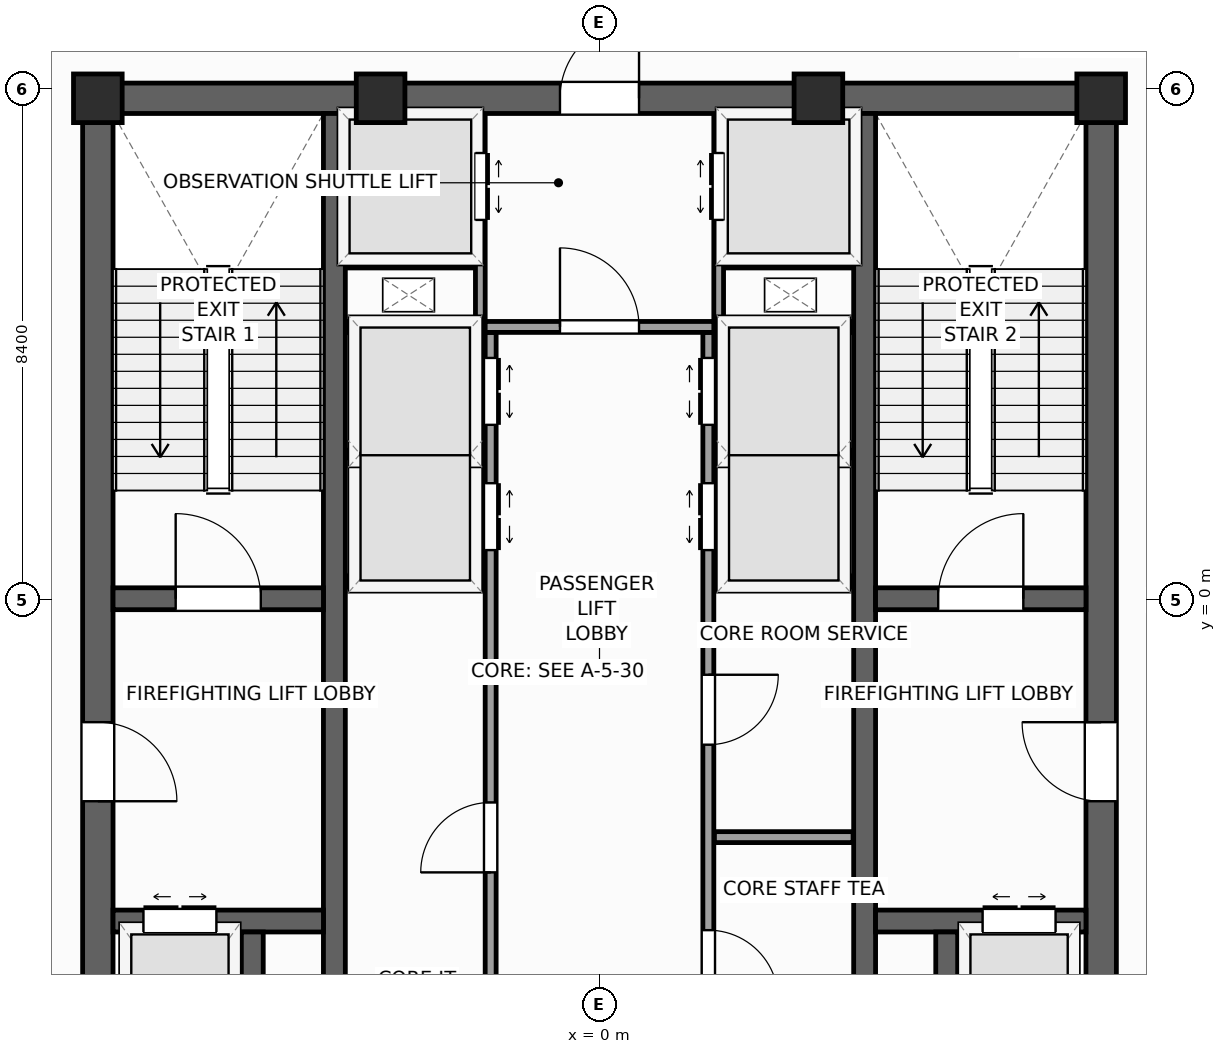
"""IFC4 building model, lengths in metres.
Left out: names, types, materials, properties, quantities, classifications, styles, units other than length and angle.
Written with IfcOpenShell. Run it as: python <this file> out.ifc"""

import sys

from ifc_helpers import new_model, si_unit, direction, frame, frame_2d, origin, origin_2d, place, context, subcontext, project, spatial, rectangle, extrude, source, transform, mapped, element, fill, save


model = new_model("IFC4")
c1 = context("Model", 3, precision=1e-05, world=origin(), true_north=direction((0.0, 1.0)))
c2 = subcontext(c1, "Body", "Model", "MODEL_VIEW")
j1 = project(units=[si_unit("LENGTHUNIT", "METRE"), si_unit("PLANEANGLEUNIT", "RADIAN")], contexts=[c1])
p1 = place(None, origin())
s1 = spatial("IfcSite", under=j1, at=p1, CompositionType="ELEMENT")
p2 = place(p1, origin())
s2 = spatial("IfcBuilding", under=s1, at=p2, CompositionType="ELEMENT")
p3 = place(p2, frame((0.0, 0.0, 312.0)))
s3 = spatial("IfcBuildingStorey", under=s2, at=p3, CompositionType="ELEMENT", Elevation=312.0)
p4 = place(p3, frame((-8.5, 8.25, 0.0), z_axis=(0.0, 0.0, 1.0), x_axis=(1.0, 0.0, 0.0)))
e1 = element("IfcWall", 1, at=p4, inside=s3, PredefinedType="SHEAR", context=c2, shape_type="SweptSolid", body=[
    extrude(rectangle(XDim=17.0, YDim=0.5, at=frame_2d((8.5, 0.0))), origin(), (0.0, 0.0, 1.0), 4.8),
])
p5 = place(p4, frame((7.85, 0.0, 0.0)))
e2 = element("IfcOpeningElement", 2, at=p5, cuts=e1, PredefinedType="OPENING", context=c2, shape_type="SweptSolid", body=[
    extrude(rectangle(XDim=1.3, YDim=2.2, at=frame_2d((0.65, 1.1))), frame((0.0, 0.26, 0.0), z_axis=(0.0, -1.0, 0.0), x_axis=(1.0, 0.0, 0.0)), (0.0, 0.0, 1.0), 0.52),
])
p6 = place(p3, frame((-8.25, -8.0, 0.0), z_axis=(0.0, 0.0, 1.0), x_axis=(0.0, 1.0, 0.0)))
e3 = element("IfcWall", 3, at=p6, inside=s3, PredefinedType="SHEAR", context=c2, shape_type="SweptSolid", body=[
    extrude(rectangle(XDim=16.0, YDim=0.5, at=frame_2d((8.0, 0.0))), origin(), (0.0, 0.0, 1.0), 4.8),
])
p7 = place(p6, frame((4.69, 0.0, 0.0)))
e4 = element("IfcOpeningElement", 4, at=p7, cuts=e3, PredefinedType="OPENING", context=c2, shape_type="SweptSolid", body=[
    extrude(rectangle(XDim=1.3, YDim=2.2, at=frame_2d((0.65, 1.1))), frame((0.0, 0.26, 0.0), z_axis=(0.0, -1.0, 0.0), x_axis=(1.0, 0.0, 0.0)), (0.0, 0.0, 1.0), 0.52),
])
p8 = place(p3, frame((8.25, -8.0, 0.0), z_axis=(0.0, 0.0, 1.0), x_axis=(0.0, 1.0, 0.0)))
e5 = element("IfcWall", 5, at=p8, inside=s3, PredefinedType="SHEAR", context=c2, shape_type="SweptSolid", body=[
    extrude(rectangle(XDim=16.0, YDim=0.5, at=frame_2d((8.0, 0.0))), origin(), (0.0, 0.0, 1.0), 4.8),
])
p9 = place(p8, frame((4.69, 0.0, 0.0)))
e6 = element("IfcOpeningElement", 6, at=p9, cuts=e5, PredefinedType="OPENING", context=c2, shape_type="SweptSolid", body=[
    extrude(rectangle(XDim=1.3, YDim=2.2, at=frame_2d((0.65, 1.1))), frame((0.0, 0.26, 0.0), z_axis=(0.0, -1.0, 0.0), x_axis=(1.0, 0.0, 0.0)), (0.0, 0.0, 1.0), 0.52),
])
for number, where, z_axis, x_axis in (
    (7, (-4.36, -8.0, 0.0), (0.0, 0.0, 1.0), (0.0, 1.0, 0.0)),
    (8, (4.36, -8.0, 0.0), (0.0, 0.0, 1.0), (0.0, 1.0, 0.0)),
):
    element("IfcWall", number, at=place(p3, frame(where, z_axis=z_axis, x_axis=x_axis)), inside=s3, PredefinedType="SHEAR", context=c2, shape_type="SweptSolid", body=[
        extrude(rectangle(XDim=16.0, YDim=0.36, at=frame_2d((8.0, 0.0))), origin(), (0.0, 0.0, 1.0), 4.8),
    ])
p10 = place(p3, frame((-8.0, 0.02, 0.0), z_axis=(0.0, 0.0, 1.0), x_axis=(1.0, 0.0, 0.0)))
e9 = element("IfcWall", 9, at=p10, inside=s3, PredefinedType="SHEAR", context=c2, shape_type="SweptSolid", body=[
    extrude(rectangle(XDim=3.46, YDim=0.36, at=frame_2d((1.73, 0.0))), origin(), (0.0, 0.0, 1.0), 4.8),
])
p11 = place(p10, frame((1.03, 0.0, 0.0)))
e10 = element("IfcOpeningElement", 10, at=p11, cuts=e9, PredefinedType="OPENING", context=c2, shape_type="SweptSolid", body=[
    extrude(rectangle(XDim=1.4, YDim=2.2, at=frame_2d((0.7, 1.1))), frame((0.0, 0.19, 0.0), z_axis=(0.0, -1.0, 0.0), x_axis=(1.0, 0.0, 0.0)), (0.0, 0.0, 1.0), 0.38),
])
p12 = place(p3, frame((4.54, 0.02, 0.0), z_axis=(0.0, 0.0, 1.0), x_axis=(1.0, 0.0, 0.0)))
e11 = element("IfcWall", 11, at=p12, inside=s3, PredefinedType="SHEAR", context=c2, shape_type="SweptSolid", body=[
    extrude(rectangle(XDim=3.46, YDim=0.36, at=frame_2d((1.73, 0.0))), origin(), (0.0, 0.0, 1.0), 4.8),
])
p13 = place(p12, frame((1.03, 0.0, 0.0)))
e12 = element("IfcOpeningElement", 12, at=p13, cuts=e11, PredefinedType="OPENING", context=c2, shape_type="SweptSolid", body=[
    extrude(rectangle(XDim=1.4, YDim=2.2, at=frame_2d((0.7, 1.1))), frame((0.0, 0.19, 0.0), z_axis=(0.0, -1.0, 0.0), x_axis=(1.0, 0.0, 0.0)), (0.0, 0.0, 1.0), 0.38),
])
p14 = place(p3, frame((-8.0, -5.28, 0.0), z_axis=(0.0, 0.0, 1.0), x_axis=(1.0, 0.0, 0.0)))
e13 = element("IfcWall", 13, at=p14, inside=s3, PredefinedType="SHEAR", context=c2, shape_type="SweptSolid", body=[
    extrude(rectangle(XDim=3.46, YDim=0.36, at=frame_2d((1.73, 0.0))), origin(), (0.0, 0.0, 1.0), 4.8),
])
p15 = place(p14, frame((0.5, 0.0, 0.0)))
e14 = element("IfcOpeningElement", 14, at=p15, cuts=e13, PredefinedType="OPENING", context=c2, shape_type="SweptSolid", body=[
    extrude(rectangle(XDim=1.2, YDim=2.25, at=frame_2d((0.6, 1.125))), frame((0.0, 0.19, 0.0), z_axis=(0.0, -1.0, 0.0), x_axis=(1.0, 0.0, 0.0)), (0.0, 0.0, 1.0), 0.38),
])
p16 = place(p3, frame((4.54, -5.28, 0.0), z_axis=(0.0, 0.0, 1.0), x_axis=(1.0, 0.0, 0.0)))
e15 = element("IfcWall", 15, at=p16, inside=s3, PredefinedType="SHEAR", context=c2, shape_type="SweptSolid", body=[
    extrude(rectangle(XDim=3.46, YDim=0.36, at=frame_2d((1.73, 0.0))), origin(), (0.0, 0.0, 1.0), 4.8),
])
p17 = place(p16, frame((1.76, 0.0, 0.0)))
e16 = element("IfcOpeningElement", 16, at=p17, cuts=e15, PredefinedType="OPENING", context=c2, shape_type="SweptSolid", body=[
    extrude(rectangle(XDim=1.2, YDim=2.25, at=frame_2d((0.6, 1.125))), frame((0.0, 0.19, 0.0), z_axis=(0.0, -1.0, 0.0), x_axis=(1.0, 0.0, 0.0)), (0.0, 0.0, 1.0), 0.38),
])
for number, where, z_axis, x_axis in (
    (17, (-5.71, -8.0, 0.0), (0.0, 0.0, 1.0), (0.0, 1.0, 0.0)),
    (18, (5.71, -8.0, 0.0), (0.0, 0.0, 1.0), (0.0, 1.0, 0.0)),
):
    element("IfcWall", number, at=place(p3, frame(where, z_axis=z_axis, x_axis=x_axis)), inside=s3, PredefinedType="SHEAR", context=c2, shape_type="SweptSolid", body=[
        extrude(rectangle(XDim=2.54, YDim=0.36, at=frame_2d((1.27, 0.0))), origin(), (0.0, 0.0, 1.0), 4.8),
    ])
m1 = source(origin(), c2, "Body", "SweptSolid", [
    extrude(rectangle(XDim=0.8, YDim=0.8, at=origin_2d()), origin(), (0.0, 0.0, 1.0), 4.8),
])
for number, where, z_axis, x_axis in (
    (19, (8.25, 8.25, 0.0), (0.0, 0.0, 1.0), (1.0, 0.0, 0.0)),
    (20, (-8.25, 8.25, 0.0), (0.0, 0.0, 1.0), (1.0, 0.0, 0.0)),
    (21, (-3.6, 8.25, 0.0), (0.0, 0.0, 1.0), (1.0, 0.0, 0.0)),
    (22, (3.6, 8.25, 0.0), (0.0, 0.0, 1.0), (1.0, 0.0, 0.0)),
):
    element("IfcColumn", number, at=place(p3, frame(where, z_axis=z_axis, x_axis=x_axis)), inside=s3, PredefinedType="PILASTER", context=c2, shape_type="MappedRepresentation", body=[
        mapped(m1, transform((0.0, 0.0, 0.0), scale=1.0)),
    ])
p18 = place(p3, frame((-1.79, -7.98, 0.0), z_axis=(0.0, 0.0, 1.0), x_axis=(0.0, 1.0, 0.0)))
e23 = element("IfcWall", 23, at=p18, inside=s3, PredefinedType="PARTITIONING", context=c2, shape_type="SweptSolid", body=[
    extrude(rectangle(XDim=12.38, YDim=0.18, at=frame_2d((6.19, 0.0))), origin(), (0.0, 0.0, 1.0), 4.55),
])
p19 = place(p18, frame((8.8, 0.0, 0.0)))
e24 = element("IfcOpeningElement", 24, at=p19, cuts=e23, PredefinedType="OPENING", context=c2, shape_type="SweptSolid", body=[
    extrude(rectangle(XDim=1.1, YDim=2.2, at=frame_2d((0.55, 1.1))), frame((0.0, 0.1, 0.0), z_axis=(0.0, -1.0, 0.0), x_axis=(1.0, 0.0, 0.0)), (0.0, 0.0, 1.0), 0.2),
])
p20 = place(p18, frame((10.86, 0.0, 0.0)))
e25 = element("IfcOpeningElement", 25, at=p20, cuts=e23, PredefinedType="OPENING", context=c2, shape_type="SweptSolid", body=[
    extrude(rectangle(XDim=1.1, YDim=2.2, at=frame_2d((0.55, 1.1))), frame((0.0, 0.1, 0.0), z_axis=(0.0, -1.0, 0.0), x_axis=(1.0, 0.0, 0.0)), (0.0, 0.0, 1.0), 0.2),
])
p21 = place(p18, frame((3.5, 0.0, 0.0)))
e26 = element("IfcOpeningElement", 26, at=p21, cuts=e23, PredefinedType="OPENING", context=c2, shape_type="SweptSolid", body=[
    extrude(rectangle(XDim=1.15, YDim=2.25, at=frame_2d((0.575, 1.125))), frame((0.0, 0.1, 0.0), z_axis=(0.0, -1.0, 0.0), x_axis=(1.0, 0.0, 0.0)), (0.0, 0.0, 1.0), 0.2),
])
p22 = place(p3, frame((1.79, -7.98, 0.0), z_axis=(0.0, 0.0, 1.0), x_axis=(0.0, 1.0, 0.0)))
e27 = element("IfcWall", 27, at=p22, inside=s3, PredefinedType="PARTITIONING", context=c2, shape_type="SweptSolid", body=[
    extrude(rectangle(XDim=12.38, YDim=0.18, at=frame_2d((6.19, 0.0))), origin(), (0.0, 0.0, 1.0), 4.55),
])
p23 = place(p22, frame((8.8, 0.0, 0.0)))
e28 = element("IfcOpeningElement", 28, at=p23, cuts=e27, PredefinedType="OPENING", context=c2, shape_type="SweptSolid", body=[
    extrude(rectangle(XDim=1.1, YDim=2.2, at=frame_2d((0.55, 1.1))), frame((0.0, 0.1, 0.0), z_axis=(0.0, -1.0, 0.0), x_axis=(1.0, 0.0, 0.0)), (0.0, 0.0, 1.0), 0.2),
])
p24 = place(p22, frame((10.86, 0.0, 0.0)))
e29 = element("IfcOpeningElement", 29, at=p24, cuts=e27, PredefinedType="OPENING", context=c2, shape_type="SweptSolid", body=[
    extrude(rectangle(XDim=1.1, YDim=2.2, at=frame_2d((0.55, 1.1))), frame((0.0, 0.1, 0.0), z_axis=(0.0, -1.0, 0.0), x_axis=(1.0, 0.0, 0.0)), (0.0, 0.0, 1.0), 0.2),
])
p25 = place(p22, frame((1.4, 0.0, 0.0)))
e30 = element("IfcOpeningElement", 30, at=p25, cuts=e27, PredefinedType="OPENING", context=c2, shape_type="SweptSolid", body=[
    extrude(rectangle(XDim=1.15, YDim=2.25, at=frame_2d((0.575, 1.125))), frame((0.0, 0.1, 0.0), z_axis=(0.0, -1.0, 0.0), x_axis=(1.0, 0.0, 0.0)), (0.0, 0.0, 1.0), 0.2),
])
p26 = place(p22, frame((5.6, 0.0, 0.0)))
e31 = element("IfcOpeningElement", 31, at=p26, cuts=e27, PredefinedType="OPENING", context=c2, shape_type="SweptSolid", body=[
    extrude(rectangle(XDim=1.15, YDim=2.25, at=frame_2d((0.575, 1.125))), frame((0.0, 0.1, 0.0), z_axis=(0.0, -1.0, 0.0), x_axis=(1.0, 0.0, 0.0)), (0.0, 0.0, 1.0), 0.2),
])
p27 = place(p3, frame((-1.88, 4.49, 0.0), z_axis=(0.0, 0.0, 1.0), x_axis=(1.0, 0.0, 0.0)))
e32 = element("IfcWall", 32, at=p27, inside=s3, PredefinedType="PARTITIONING", context=c2, shape_type="SweptSolid", body=[
    extrude(rectangle(XDim=3.76, YDim=0.18, at=frame_2d((1.88, 0.0))), origin(), (0.0, 0.0, 1.0), 4.55),
])
p28 = place(p27, frame((1.23, 0.0, 0.0)))
e33 = element("IfcOpeningElement", 33, at=p28, cuts=e32, PredefinedType="OPENING", context=c2, shape_type="SweptSolid", body=[
    extrude(rectangle(XDim=1.3, YDim=2.2, at=frame_2d((0.65, 1.1))), frame((0.0, 0.1, 0.0), z_axis=(0.0, -1.0, 0.0), x_axis=(1.0, 0.0, 0.0)), (0.0, 0.0, 1.0), 0.2),
])
for number, where, z_axis, x_axis in (
    (34, (1.89, -3.9, 0.0), (0.0, 0.0, 1.0), (1.0, 0.0, 0.0)),
    (35, (-4.17, 0.3, 0.0), (0.0, 0.0, 1.0), (1.0, 0.0, 0.0)),
    (36, (1.89, 0.3, 0.0), (0.0, 0.0, 1.0), (1.0, 0.0, 0.0)),
    (37, (-4.17, 4.49, 0.0), (0.0, 0.0, 1.0), (1.0, 0.0, 0.0)),
    (38, (1.89, 4.49, 0.0), (0.0, 0.0, 1.0), (1.0, 0.0, 0.0)),
):
    element("IfcWall", number, at=place(p3, frame(where, z_axis=z_axis, x_axis=x_axis)), inside=s3, PredefinedType="PARTITIONING", context=c2, shape_type="SweptSolid", body=[
        extrude(rectangle(XDim=2.28, YDim=0.18, at=frame_2d((1.14, 0.0))), origin(), (0.0, 0.0, 1.0), 4.55),
    ])
for number, where, z_axis, x_axis in (
    (39, (-4.16, 2.4, 0.0), (0.0, 0.0, 1.0), (1.0, 0.0, 0.0)),
    (40, (1.9, 2.4, 0.0), (0.0, 0.0, 1.0), (1.0, 0.0, 0.0)),
):
    element("IfcWall", number, at=place(p3, frame(where, z_axis=z_axis, x_axis=x_axis)), inside=s3, PredefinedType="PARTITIONING", context=c2, shape_type="SweptSolid", body=[
        extrude(rectangle(XDim=2.26, YDim=0.12, at=frame_2d((1.13, 0.0))), origin(), (0.0, 0.0, 1.0), 4.55),
    ])
p29 = place(p3, frame((-1.96, 4.58, 0.0), z_axis=(0.0, 0.0, 1.0), x_axis=(0.0, 1.0, 0.0)))
e41 = element("IfcWall", 41, at=p29, inside=s3, PredefinedType="PARTITIONING", context=c2, shape_type="SweptSolid", body=[
    extrude(rectangle(XDim=3.4, YDim=0.16, at=frame_2d((1.7, 0.0))), origin(), (0.0, 0.0, 1.0), 4.55),
])
p30 = place(p29, frame((1.67, 0.0, 0.0)))
e42 = element("IfcOpeningElement", 42, at=p30, cuts=e41, PredefinedType="OPENING", context=c2, shape_type="SweptSolid", body=[
    extrude(rectangle(XDim=1.1, YDim=2.2, at=frame_2d((0.55, 1.1))), frame((0.0, 0.09, 0.0), z_axis=(0.0, -1.0, 0.0), x_axis=(1.0, 0.0, 0.0)), (0.0, 0.0, 1.0), 0.18),
])
p31 = place(p3, frame((1.96, 4.58, 0.0), z_axis=(0.0, 0.0, 1.0), x_axis=(0.0, 1.0, 0.0)))
e43 = element("IfcWall", 43, at=p31, inside=s3, PredefinedType="PARTITIONING", context=c2, shape_type="SweptSolid", body=[
    extrude(rectangle(XDim=3.4, YDim=0.16, at=frame_2d((1.7, 0.0))), origin(), (0.0, 0.0, 1.0), 4.55),
])
p32 = place(p31, frame((1.67, 0.0, 0.0)))
e44 = element("IfcOpeningElement", 44, at=p32, cuts=e43, PredefinedType="OPENING", context=c2, shape_type="SweptSolid", body=[
    extrude(rectangle(XDim=1.1, YDim=2.2, at=frame_2d((0.55, 1.1))), frame((0.0, 0.09, 0.0), z_axis=(0.0, -1.0, 0.0), x_axis=(1.0, 0.0, 0.0)), (0.0, 0.0, 1.0), 0.18),
])
for number, where, z_axis, x_axis in (
    (45, (-4.16, 5.52, 0.0), (0.0, 0.0, 1.0), (1.0, 0.0, 0.0)),
    (46, (2.06, 5.52, 0.0), (0.0, 0.0, 1.0), (1.0, 0.0, 0.0)),
):
    element("IfcWall", number, at=place(p3, frame(where, z_axis=z_axis, x_axis=x_axis)), inside=s3, PredefinedType="PARTITIONING", context=c2, shape_type="SweptSolid", body=[
        extrude(rectangle(XDim=2.1, YDim=0.12, at=frame_2d((1.05, 0.0))), origin(), (0.0, 0.0, 1.0), 4.55),
    ])
m2 = source(origin(), c2, "Body", "SweptSolid", [
    extrude(rectangle(XDim=1.4, YDim=2.2, at=frame_2d((0.7, 1.1))), frame((0.0, 0.025, 0.0), z_axis=(0.0, -1.0, 0.0), x_axis=(1.0, 0.0, 0.0)), (0.0, 0.0, 1.0), 0.05),
])
p33 = place(p11, origin())
e47 = element("IfcDoor", 47, at=p33, inside=s3, OperationType="SINGLE_SWING_LEFT", PredefinedType="DOOR", context=c2, shape_type="MappedRepresentation", body=[
    mapped(m2, transform((0.0, 0.0, 0.0), scale=1.0)),
])
fill(e10, e47)
p34 = place(p13, origin())
e48 = element("IfcDoor", 48, at=p34, inside=s3, OperationType="SINGLE_SWING_RIGHT", PredefinedType="DOOR", context=c2, shape_type="MappedRepresentation", body=[
    mapped(m2, transform((0.0, 0.0, 0.0), scale=1.0)),
])
fill(e12, e48)
m3 = source(origin(), c2, "Body", "SweptSolid", [
    extrude(rectangle(XDim=1.3, YDim=2.2, at=frame_2d((0.65, 1.1))), frame((0.0, 0.025, 0.0), z_axis=(0.0, -1.0, 0.0), x_axis=(1.0, 0.0, 0.0)), (0.0, 0.0, 1.0), 0.05),
])
p35 = place(p7, frame((1.3, 0.0, 0.0), z_axis=(0.0, 0.0, 1.0), x_axis=(-1.0, 0.0, 0.0)))
e49 = element("IfcDoor", 49, at=p35, inside=s3, OperationType="SINGLE_SWING_LEFT", PredefinedType="DOOR", context=c2, shape_type="MappedRepresentation", body=[
    mapped(m3, transform((0.0, 0.0, 0.0), scale=1.0)),
])
fill(e4, e49)
p36 = place(p9, origin())
e50 = element("IfcDoor", 50, at=p36, inside=s3, OperationType="SINGLE_SWING_RIGHT", PredefinedType="DOOR", context=c2, shape_type="MappedRepresentation", body=[
    mapped(m3, transform((0.0, 0.0, 0.0), scale=1.0)),
])
fill(e6, e50)
m4 = source(origin(), c2, "Body", "SweptSolid", [
    extrude(rectangle(XDim=1.2, YDim=2.25, at=frame_2d((0.6, 1.125))), frame((0.0, 0.025, 0.0), z_axis=(0.0, -1.0, 0.0), x_axis=(1.0, 0.0, 0.0)), (0.0, 0.0, 1.0), 0.05),
])
p37 = place(p15, origin())
e51 = element("IfcDoor", 51, at=p37, inside=s3, OperationType="DOUBLE_DOOR_SLIDING", PredefinedType="DOOR", context=c2, shape_type="MappedRepresentation", body=[
    mapped(m4, transform((0.0, 0.0, 0.0), scale=1.0)),
])
fill(e14, e51)
p38 = place(p17, origin())
e52 = element("IfcDoor", 52, at=p38, inside=s3, OperationType="DOUBLE_DOOR_SLIDING", PredefinedType="DOOR", context=c2, shape_type="MappedRepresentation", body=[
    mapped(m4, transform((0.0, 0.0, 0.0), scale=1.0)),
])
fill(e16, e52)
m5 = source(origin(), c2, "Body", "SweptSolid", [
    extrude(rectangle(XDim=1.1, YDim=2.2, at=frame_2d((0.55, 1.1))), frame((0.0, 0.025, 0.0), z_axis=(0.0, -1.0, 0.0), x_axis=(1.0, 0.0, 0.0)), (0.0, 0.0, 1.0), 0.05),
])
p39 = place(p19, frame((1.1, 0.0, 0.0), z_axis=(0.0, 0.0, 1.0), x_axis=(-1.0, 0.0, 0.0)))
e53 = element("IfcDoor", 53, at=p39, inside=s3, OperationType="DOUBLE_DOOR_SLIDING", PredefinedType="DOOR", context=c2, shape_type="MappedRepresentation", body=[
    mapped(m5, transform((0.0, 0.0, 0.0), scale=1.0)),
])
fill(e24, e53)
p40 = place(p20, frame((1.1, 0.0, 0.0), z_axis=(0.0, 0.0, 1.0), x_axis=(-1.0, 0.0, 0.0)))
e54 = element("IfcDoor", 54, at=p40, inside=s3, OperationType="DOUBLE_DOOR_SLIDING", PredefinedType="DOOR", context=c2, shape_type="MappedRepresentation", body=[
    mapped(m5, transform((0.0, 0.0, 0.0), scale=1.0)),
])
fill(e25, e54)
p41 = place(p23, origin())
e55 = element("IfcDoor", 55, at=p41, inside=s3, OperationType="DOUBLE_DOOR_SLIDING", PredefinedType="DOOR", context=c2, shape_type="MappedRepresentation", body=[
    mapped(m5, transform((0.0, 0.0, 0.0), scale=1.0)),
])
fill(e28, e55)
p42 = place(p24, origin())
e56 = element("IfcDoor", 56, at=p42, inside=s3, OperationType="DOUBLE_DOOR_SLIDING", PredefinedType="DOOR", context=c2, shape_type="MappedRepresentation", body=[
    mapped(m5, transform((0.0, 0.0, 0.0), scale=1.0)),
])
fill(e29, e56)
m6 = source(origin(), c2, "Body", "SweptSolid", [
    extrude(rectangle(XDim=1.15, YDim=2.25, at=frame_2d((0.575, 1.125))), frame((0.0, 0.025, 0.0), z_axis=(0.0, -1.0, 0.0), x_axis=(1.0, 0.0, 0.0)), (0.0, 0.0, 1.0), 0.05),
])
p43 = place(p21, origin())
e57 = element("IfcDoor", 57, at=p43, inside=s3, OperationType="SINGLE_SWING_LEFT", PredefinedType="DOOR", context=c2, shape_type="MappedRepresentation", body=[
    mapped(m6, transform((0.0, 0.0, 0.0), scale=1.0)),
])
fill(e26, e57)
p44 = place(p25, frame((1.15, 0.0, 0.0), z_axis=(0.0, 0.0, 1.0), x_axis=(-1.0, 0.0, 0.0)))
e58 = element("IfcDoor", 58, at=p44, inside=s3, OperationType="SINGLE_SWING_LEFT", PredefinedType="DOOR", context=c2, shape_type="MappedRepresentation", body=[
    mapped(m6, transform((0.0, 0.0, 0.0), scale=1.0)),
])
fill(e30, e58)
p45 = place(p26, frame((1.15, 0.0, 0.0), z_axis=(0.0, 0.0, 1.0), x_axis=(-1.0, 0.0, 0.0)))
e59 = element("IfcDoor", 59, at=p45, inside=s3, OperationType="SINGLE_SWING_RIGHT", PredefinedType="DOOR", context=c2, shape_type="MappedRepresentation", body=[
    mapped(m6, transform((0.0, 0.0, 0.0), scale=1.0)),
])
fill(e31, e59)
p46 = place(p28, origin())
e60 = element("IfcDoor", 60, at=p46, inside=s3, OperationType="SINGLE_SWING_LEFT", PredefinedType="DOOR", context=c2, shape_type="MappedRepresentation", body=[
    mapped(m3, transform((0.0, 0.0, 0.0), scale=1.0)),
])
fill(e33, e60)
p47 = place(p5, origin())
e61 = element("IfcDoor", 61, at=p47, inside=s3, OperationType="SINGLE_SWING_RIGHT", PredefinedType="DOOR", context=c2, shape_type="MappedRepresentation", body=[
    mapped(m3, transform((0.0, 0.0, 0.0), scale=1.0)),
])
fill(e2, e61)
p48 = place(p30, frame((1.1, 0.0, 0.0), z_axis=(0.0, 0.0, 1.0), x_axis=(-1.0, 0.0, 0.0)))
e62 = element("IfcDoor", 62, at=p48, inside=s3, OperationType="DOUBLE_DOOR_SLIDING", PredefinedType="DOOR", context=c2, shape_type="MappedRepresentation", body=[
    mapped(m5, transform((0.0, 0.0, 0.0), scale=1.0)),
])
fill(e42, e62)
p49 = place(p32, origin())
e63 = element("IfcDoor", 63, at=p49, inside=s3, OperationType="DOUBLE_DOOR_SLIDING", PredefinedType="DOOR", context=c2, shape_type="MappedRepresentation", body=[
    mapped(m5, transform((0.0, 0.0, 0.0), scale=1.0)),
])
fill(e44, e63)
save(model, sys.argv[1])
